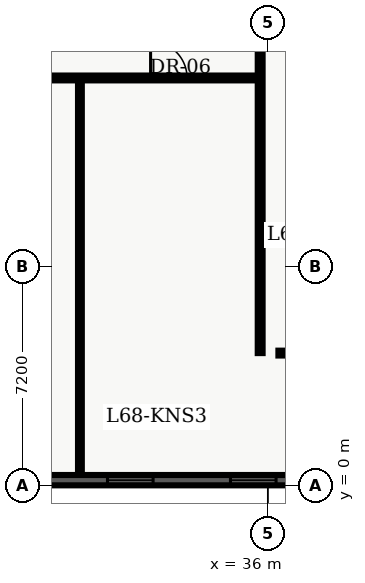
"""IFC4 building model, lengths in metres.
Left out: names, types, materials, properties, quantities, classifications, styles, units other than length and angle.
Written with IfcOpenShell. Run it as: python <this file> out.ifc"""

import sys

from ifc_helpers import new_model, entity, si_unit, converted_unit, direction, frame, origin_with_axes, origin_2d_with_axis, place, context, subcontext, project, spatial, polyline, rectangle, outline, extrude, element, fill, save


model = new_model("IFC4")
c1 = context("Model", 3, precision=1e-05, world=origin_with_axes(), true_north=direction((0.0, 1.0)))
c2 = subcontext(c1, "Body", "Model", "MODEL_VIEW")
j1 = project(units=[si_unit("LENGTHUNIT", "METRE"), converted_unit("PLANEANGLEUNIT", "DEGREE", entity("IfcPlaneAngleMeasure", 0.017), si_unit("PLANEANGLEUNIT", "RADIAN"), dimensions=[0, 0, 0, 0, 0, 0, 0])], contexts=[c1])
p1 = place(None, origin_with_axes())
s1 = spatial("IfcSite", under=j1, at=p1, CompositionType="ELEMENT")
p2 = place(p1, origin_with_axes())
s2 = spatial("IfcBuilding", under=s1, at=p2, CompositionType="ELEMENT")
p3 = place(p2, frame((0.0, 0.0, 276.3), z_axis=(0.0, 0.0, 1.0), x_axis=(1.0, 0.0, 0.0)))
s3 = spatial("IfcBuildingStorey", under=s2, at=p3, CompositionType="ELEMENT", Elevation=276.3)
p4 = place(p3, frame((20.3, 13.4, 0.0), z_axis=(0.0, 0.0, 1.0), x_axis=(1.0, 0.0, 0.0)))
e1 = element("IfcWall", 1, at=p4, inside=s3, PredefinedType="PARTITIONING", context=c2, shape_type="SweptSolid", body=[
    extrude(outline(polyline([(0.0, -0.08), (15.45, -0.08), (15.45, 0.08), (0.0, 0.08), (0.0, -0.08)])), origin_with_axes(), (0.0, 0.0, 1.0), 2.7),
])
p5 = place(p4, frame((2.34, 0.0, 0.0), z_axis=(0.0, 0.0, 1.0), x_axis=(1.0, 0.0, 0.0)))
e2 = element("IfcOpeningElement", 2, at=p5, cuts=e1, PredefinedType="OPENING", context=c2, shape_type="SweptSolid", body=[
    extrude(rectangle(XDim=1.0, YDim=0.18, at=origin_2d_with_axis()), origin_with_axes(), (0.0, 0.0, 1.0), 2.15),
])
p6 = place(p4, frame((7.011, 0.0, 0.0), z_axis=(0.0, 0.0, 1.0), x_axis=(1.0, 0.0, 0.0)))
e3 = element("IfcOpeningElement", 3, at=p6, cuts=e1, PredefinedType="OPENING", context=c2, shape_type="SweptSolid", body=[
    extrude(rectangle(XDim=1.0, YDim=0.18, at=origin_2d_with_axis()), origin_with_axes(), (0.0, 0.0, 1.0), 2.15),
])
p7 = place(p4, frame((12.445, 0.0, 0.0), z_axis=(0.0, 0.0, 1.0), x_axis=(1.0, 0.0, 0.0)))
e4 = element("IfcOpeningElement", 4, at=p7, cuts=e1, PredefinedType="OPENING", context=c2, shape_type="SweptSolid", body=[
    extrude(rectangle(XDim=1.2, YDim=0.18, at=origin_2d_with_axis()), origin_with_axes(), (0.0, 0.0, 1.0), 2.2),
])
p8 = place(p3, frame((35.75, 4.35, 0.0), z_axis=(0.0, 0.0, 1.0), x_axis=(0.0, 1.0, 0.0)))
e5 = element("IfcWall", 5, at=p8, inside=s3, PredefinedType="PARTITIONING", context=c2, shape_type="SweptSolid", body=[
    extrude(outline(polyline([(0.0, -0.08), (16.95, -0.08), (16.95, 0.08), (0.0, 0.08), (0.0, -0.08)])), origin_with_axes(), (0.0, 0.0, 1.0), 2.7),
])
p9 = place(p3, frame((29.821, 0.335, 0.0), z_axis=(0.0, 0.0, 1.0), x_axis=(0.0, 1.0, 0.0)))
e6 = element("IfcWall", 6, at=p9, inside=s3, PredefinedType="PARTITIONING", context=c2, shape_type="SweptSolid", body=[
    extrude(outline(polyline([(0.0, -0.062), (12.945, -0.062), (12.945, 0.062), (0.0, 0.062), (0.0, -0.062)])), origin_with_axes(), (0.0, 0.0, 1.0), 2.7),
])
p10 = place(p3, frame((36.35, 4.35, 0.0), z_axis=(0.0, 0.0, 1.0), x_axis=(1.0, 0.0, 0.0)))
e7 = element("IfcWall", 7, at=p10, inside=s3, PredefinedType="PARTITIONING", context=c2, shape_type="SweptSolid", body=[
    extrude(outline(polyline([(0.0, -0.08), (3.725, -0.08), (3.725, 0.08), (0.0, 0.08), (0.0, -0.08)])), origin_with_axes(), (0.0, 0.0, 1.0), 2.7),
])
p11 = place(p10, frame((0.9, 0.0, 0.0), z_axis=(0.0, 0.0, 1.0), x_axis=(1.0, 0.0, 0.0)))
e8 = element("IfcOpeningElement", 8, at=p11, cuts=e7, PredefinedType="OPENING", context=c2, shape_type="SweptSolid", body=[
    extrude(rectangle(XDim=0.9, YDim=0.18, at=origin_2d_with_axis()), origin_with_axes(), (0.0, 0.0, 1.0), 2.15),
])
p12 = place(p3, frame((47.36, 0.17, 0.0), z_axis=(0.0, 0.0, 1.0), x_axis=(-1.0, 0.0, 0.0)))
e9 = element("IfcWall", 9, at=p12, inside=s3, PredefinedType="SOLIDWALL", context=c2, shape_type="SweptSolid", body=[
    extrude(outline(polyline([(0.0, -0.17), (37.16, -0.17), (37.16, 0.17), (0.0, 0.17), (0.0, -0.17)])), origin_with_axes(), (0.0, 0.0, 1.0), 3.66),
])
p13 = place(p12, frame((2.847, 0.0, 0.45), z_axis=(0.0, 0.0, 1.0), x_axis=(1.0, 0.0, 0.0)))
e10 = element("IfcOpeningElement", 10, at=p13, cuts=e9, PredefinedType="OPENING", context=c2, shape_type="SweptSolid", body=[
    extrude(rectangle(XDim=1.5, YDim=0.36, at=origin_2d_with_axis()), origin_with_axes(), (0.0, 0.0, 1.0), 2.1),
])
p14 = place(p12, frame((7.342, 0.0, 0.45), z_axis=(0.0, 0.0, 1.0), x_axis=(1.0, 0.0, 0.0)))
e11 = element("IfcOpeningElement", 11, at=p14, cuts=e9, PredefinedType="OPENING", context=c2, shape_type="SweptSolid", body=[
    extrude(rectangle(XDim=1.5, YDim=0.36, at=origin_2d_with_axis()), origin_with_axes(), (0.0, 0.0, 1.0), 2.1),
])
p15 = place(p12, frame((11.837, 0.0, 0.45), z_axis=(0.0, 0.0, 1.0), x_axis=(1.0, 0.0, 0.0)))
e12 = element("IfcOpeningElement", 12, at=p15, cuts=e9, PredefinedType="OPENING", context=c2, shape_type="SweptSolid", body=[
    extrude(rectangle(XDim=1.5, YDim=0.36, at=origin_2d_with_axis()), origin_with_axes(), (0.0, 0.0, 1.0), 2.1),
])
p16 = place(p12, frame((15.882, 0.0, 0.45), z_axis=(0.0, 0.0, 1.0), x_axis=(1.0, 0.0, 0.0)))
e13 = element("IfcOpeningElement", 13, at=p16, cuts=e9, PredefinedType="OPENING", context=c2, shape_type="SweptSolid", body=[
    extrude(rectangle(XDim=1.5, YDim=0.36, at=origin_2d_with_axis()), origin_with_axes(), (0.0, 0.0, 1.0), 2.1),
])
p17 = place(p12, frame((20.827, 0.0, 0.45), z_axis=(0.0, 0.0, 1.0), x_axis=(1.0, 0.0, 0.0)))
e14 = element("IfcOpeningElement", 14, at=p17, cuts=e9, PredefinedType="OPENING", context=c2, shape_type="SweptSolid", body=[
    extrude(rectangle(XDim=1.5, YDim=0.36, at=origin_2d_with_axis()), origin_with_axes(), (0.0, 0.0, 1.0), 2.1),
])
p18 = place(p12, frame((25.322, 0.0, 0.45), z_axis=(0.0, 0.0, 1.0), x_axis=(1.0, 0.0, 0.0)))
e15 = element("IfcOpeningElement", 15, at=p18, cuts=e9, PredefinedType="OPENING", context=c2, shape_type="SweptSolid", body=[
    extrude(rectangle(XDim=1.5, YDim=0.36, at=origin_2d_with_axis()), origin_with_axes(), (0.0, 0.0, 1.0), 2.1),
])
p19 = place(p12, frame((29.817, 0.0, 0.45), z_axis=(0.0, 0.0, 1.0), x_axis=(1.0, 0.0, 0.0)))
e16 = element("IfcOpeningElement", 16, at=p19, cuts=e9, PredefinedType="OPENING", context=c2, shape_type="SweptSolid", body=[
    extrude(rectangle(XDim=1.5, YDim=0.36, at=origin_2d_with_axis()), origin_with_axes(), (0.0, 0.0, 1.0), 2.1),
])
p20 = place(p12, frame((34.312, 0.0, 0.45), z_axis=(0.0, 0.0, 1.0), x_axis=(1.0, 0.0, 0.0)))
e17 = element("IfcOpeningElement", 17, at=p20, cuts=e9, PredefinedType="OPENING", context=c2, shape_type="SweptSolid", body=[
    extrude(rectangle(XDim=1.5, YDim=0.36, at=origin_2d_with_axis()), origin_with_axes(), (0.0, 0.0, 1.0), 2.1),
])
p21 = place(p4, frame((12.445, 0.0, 0.0), z_axis=(0.0, 0.0, 1.0), x_axis=(1.0, 0.0, 0.0)))
e18 = element("IfcDoor", 18, at=p21, inside=s3, OperationType="SINGLE_SWING_LEFT", PredefinedType="DOOR", context=c2, shape_type="SweptSolid", body=[
    extrude(rectangle(XDim=1.2, YDim=0.09, at=origin_2d_with_axis()), origin_with_axes(), (0.0, 0.0, 1.0), 2.2),
])
fill(e4, e18)
p22 = place(p12, frame((11.837, 0.0, 0.45), z_axis=(0.0, 0.0, 1.0), x_axis=(1.0, 0.0, 0.0)))
e19 = element("IfcWindow", 19, at=p22, inside=s3, PredefinedType="WINDOW", context=c2, shape_type="SweptSolid", body=[
    extrude(rectangle(XDim=1.5, YDim=0.09, at=origin_2d_with_axis()), origin_with_axes(), (0.0, 0.0, 1.0), 2.1),
])
fill(e12, e19)
p23 = place(p12, frame((15.882, 0.0, 0.45), z_axis=(0.0, 0.0, 1.0), x_axis=(1.0, 0.0, 0.0)))
e20 = element("IfcWindow", 20, at=p23, inside=s3, PredefinedType="WINDOW", context=c2, shape_type="SweptSolid", body=[
    extrude(rectangle(XDim=1.5, YDim=0.09, at=origin_2d_with_axis()), origin_with_axes(), (0.0, 0.0, 1.0), 2.1),
])
fill(e13, e20)
save(model, sys.argv[1])
